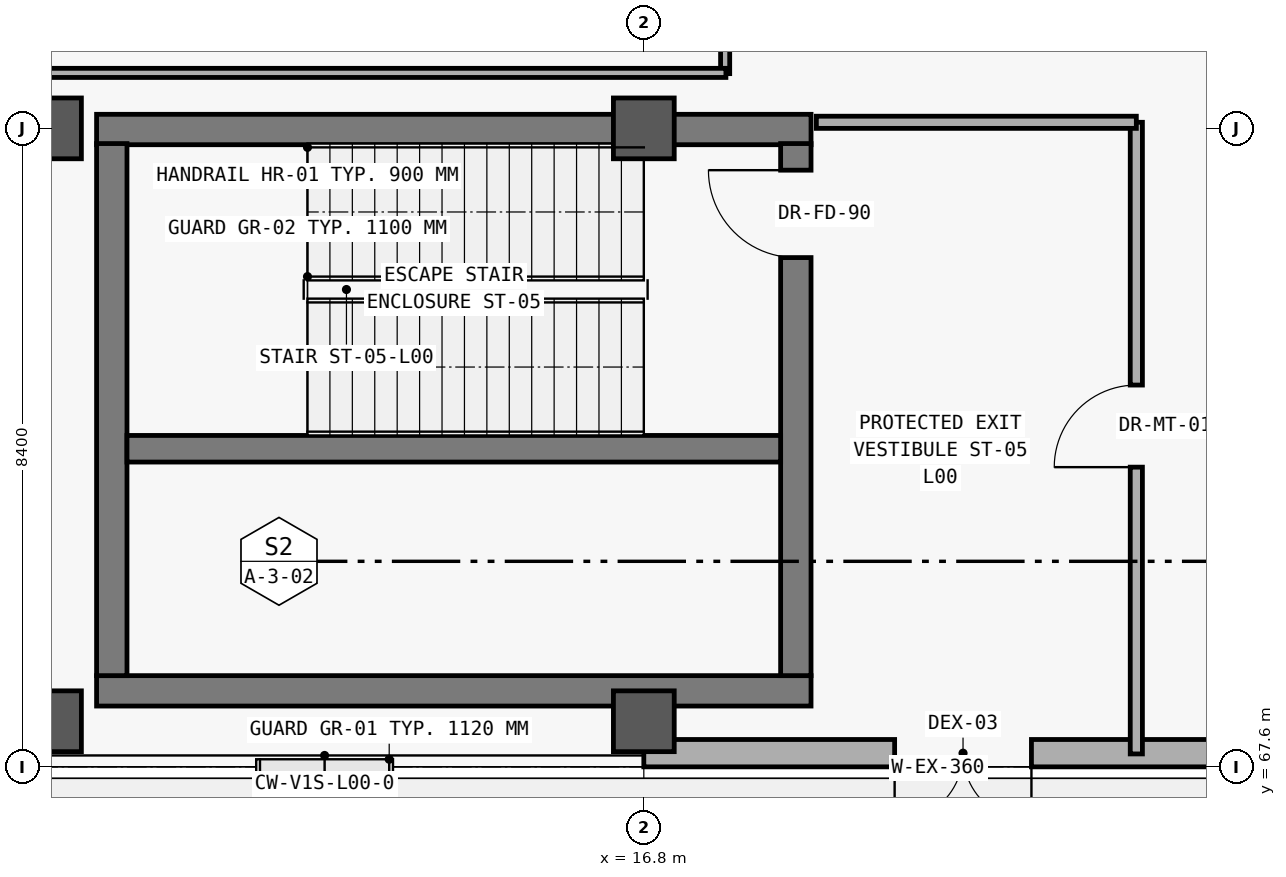
"""IFC4 building model, lengths in metres.
Left out: names, types, materials, properties, quantities, classifications, styles, units other than length and angle.
Written with IfcOpenShell. Run it as: python <this file> out.ifc"""

import sys

from ifc_helpers import new_model, si_unit, direction, frame, frame_2d, origin, origin_2d, place, context, subcontext, project, spatial, rectangle, extrude, element, fill, save


model = new_model("IFC4")
c1 = context("Model", 3, precision=1e-05, world=origin(), true_north=direction((0.0, 1.0)))
c2 = subcontext(c1, "Body", "Model", "MODEL_VIEW")
j1 = project(units=[si_unit("LENGTHUNIT", "METRE"), si_unit("PLANEANGLEUNIT", "RADIAN")], contexts=[c1])
p1 = place(None, origin())
s1 = spatial("IfcSite", under=j1, at=p1, CompositionType="ELEMENT")
p2 = place(p1, origin())
s2 = spatial("IfcBuilding", under=s1, at=p2, CompositionType="ELEMENT")
p3 = place(p2, origin())
s3 = spatial("IfcBuildingStorey", under=s2, at=p3, CompositionType="ELEMENT", Elevation=0.0)
for number, where, z_axis, x_axis in (
    (1, (9.0, 68.2, 0.0), (0.0, 0.0, 1.0), (1.0, 0.0, 0.0)),
    (2, (9.0, 76.0, 0.0), (0.0, 0.0, 1.0), (1.0, 0.0, 0.0)),
    (3, (16.8, 68.2, 0.0), (0.0, 0.0, 1.0), (1.0, 0.0, 0.0)),
    (4, (16.8, 76.0, 0.0), (0.0, 0.0, 1.0), (1.0, 0.0, 0.0)),
):
    element("IfcColumn", number, at=place(p3, frame(where, z_axis=z_axis, x_axis=x_axis)), inside=s3, PredefinedType="COLUMN", context=c2, shape_type="SweptSolid", body=[
        extrude(rectangle(XDim=0.8, YDim=0.8, at=origin_2d()), origin(), (0.0, 0.0, 1.0), 5.4),
    ])
p4 = place(p3, frame((25.2, 67.78, 0.0), z_axis=(0.0, 0.0, 1.0), x_axis=(-1.0, 0.0, 0.0)))
e5 = element("IfcWall", 5, at=p4, inside=s3, PredefinedType="SOLIDWALL", context=c2, shape_type="SweptSolid", body=[
    extrude(rectangle(XDim=8.4, YDim=0.36, at=frame_2d((4.2, 0.0))), origin(), (0.0, 0.0, 1.0), 5.08),
])
p5 = place(p4, frame((3.3, 0.0, 0.0)))
e6 = element("IfcOpeningElement", 6, at=p5, cuts=e5, PredefinedType="OPENING", context=c2, shape_type="SweptSolid", body=[
    extrude(rectangle(XDim=1.8, YDim=2.4, at=frame_2d((0.9, 1.2))), frame((0.0, 0.19, 0.0), z_axis=(0.0, -1.0, 0.0), x_axis=(1.0, 0.0, 0.0)), (0.0, 0.0, 1.0), 0.38),
])
for number, where, z_axis, x_axis in (
    (7, (9.6, 68.6, 0.0), (0.0, 0.0, 1.0), (1.0, 0.0, 0.0)),
    (8, (19.0, 75.985, 0.0), (0.0, 0.0, 1.0), (-1.0, 0.0, 0.0)),
):
    element("IfcWall", number, at=place(p3, frame(where, z_axis=z_axis, x_axis=x_axis)), inside=s3, PredefinedType="SHEAR", context=c2, shape_type="SweptSolid", body=[
        extrude(rectangle(XDim=9.4, YDim=0.4, at=frame_2d((4.7, 0.0))), origin(), (0.0, 0.0, 1.0), 5.08),
    ])
p6 = place(p3, frame((9.8, 75.8, 0.0), z_axis=(0.0, 0.0, 1.0), x_axis=(0.0, -1.0, 0.0)))
e9 = element("IfcWall", 9, at=p6, inside=s3, PredefinedType="SHEAR", context=c2, shape_type="SweptSolid", body=[
    extrude(rectangle(XDim=7.0, YDim=0.4, at=frame_2d((3.5, 0.0))), origin(), (0.0, 0.0, 1.0), 5.08),
])
p7 = place(p3, frame((18.8, 68.8, 0.0), z_axis=(0.0, 0.0, 1.0), x_axis=(0.0, 1.0, 0.0)))
e10 = element("IfcWall", 10, at=p7, inside=s3, PredefinedType="SHEAR", context=c2, shape_type="SweptSolid", body=[
    extrude(rectangle(XDim=7.0, YDim=0.4, at=frame_2d((3.5, 0.0))), origin(), (0.0, 0.0, 1.0), 5.08),
])
p8 = place(p7, frame((5.5, 0.0, 0.0)))
e11 = element("IfcOpeningElement", 11, at=p8, cuts=e10, PredefinedType="OPENING", context=c2, shape_type="SweptSolid", body=[
    extrude(rectangle(XDim=1.15, YDim=2.2, at=frame_2d((0.575, 1.1))), frame((0.0, 0.21, 0.0), z_axis=(0.0, -1.0, 0.0), x_axis=(1.0, 0.0, 0.0)), (0.0, 0.0, 1.0), 0.42),
])
p9 = place(p3, frame((10.0, 71.785, 0.0), z_axis=(0.0, 0.0, 1.0), x_axis=(1.0, 0.0, 0.0)))
e12 = element("IfcWall", 12, at=p9, inside=s3, PredefinedType="SHEAR", context=c2, shape_type="SweptSolid", body=[
    extrude(rectangle(XDim=8.6, YDim=0.35, at=frame_2d((4.3, 0.0))), origin(), (0.0, 0.0, 1.0), 5.08),
])
p10 = place(p3, frame((17.87, 76.72, 0.0), z_axis=(0.0, 0.0, 1.0), x_axis=(0.0, 1.0, 0.0)))
e13 = element("IfcWall", 13, at=p10, inside=s3, PredefinedType="PARTITIONING", context=c2, shape_type="SweptSolid", body=[
    extrude(rectangle(XDim=4.96, YDim=0.12, at=frame_2d((2.48, 0.0))), origin(), (0.0, 0.0, 1.0), 4.18),
])
p11 = place(p10, frame((3.006, 0.0, 0.0)))
e14 = element("IfcOpeningElement", 14, at=p11, cuts=e13, PredefinedType="OPENING", context=c2, shape_type="SweptSolid", body=[
    extrude(rectangle(XDim=0.92, YDim=2.15, at=frame_2d((0.46, 1.075))), frame((0.0, 0.07, 0.0), z_axis=(0.0, -1.0, 0.0), x_axis=(1.0, 0.0, 0.0)), (0.0, 0.0, 1.0), 0.14),
])
p12 = place(p3, frame((23.28, 67.77, 0.0), z_axis=(0.0, 0.0, 1.0), x_axis=(0.0, 1.0, 0.0)))
e15 = element("IfcWall", 15, at=p12, inside=s3, PredefinedType="PARTITIONING", context=c2, shape_type="SweptSolid", body=[
    extrude(rectangle(XDim=8.31, YDim=0.16, at=frame_2d((4.155, 0.0))), origin(), (0.0, 0.0, 1.0), 4.18),
])
p13 = place(p12, frame((3.773, 0.0, 0.0)))
e16 = element("IfcOpeningElement", 16, at=p13, cuts=e15, PredefinedType="OPENING", context=c2, shape_type="SweptSolid", body=[
    extrude(rectangle(XDim=1.08, YDim=2.25, at=frame_2d((0.54, 1.125))), frame((0.0, 0.09, 0.0), z_axis=(0.0, -1.0, 0.0), x_axis=(1.0, 0.0, 0.0)), (0.0, 0.0, 1.0), 0.18),
])
p14 = place(p3, frame((8.64, 76.73, 0.0), z_axis=(0.0, 0.0, 1.0), x_axis=(1.0, 0.0, 0.0)))
e17 = element("IfcWall", 17, at=p14, inside=s3, PredefinedType="PARTITIONING", context=c2, shape_type="SweptSolid", body=[
    extrude(rectangle(XDim=9.24, YDim=0.12, at=frame_2d((4.62, 0.0))), origin(), (0.0, 0.0, 1.0), 4.18),
])
p15 = place(p3, frame((19.07, 76.08, 0.0), z_axis=(0.0, 0.0, 1.0), x_axis=(1.0, 0.0, 0.0)))
e18 = element("IfcWall", 18, at=p15, inside=s3, PredefinedType="PARTITIONING", context=c2, shape_type="SweptSolid", body=[
    extrude(rectangle(XDim=4.21, YDim=0.16, at=frame_2d((2.105, 0.0))), origin(), (0.0, 0.0, 1.0), 4.18),
])
p16 = place(p5, origin())
e19 = element("IfcDoor", 19, at=p16, inside=s3, OperationType="DOUBLE_DOOR_SINGLE_SWING", PredefinedType="DOOR", context=c2, shape_type="SweptSolid", body=[
    extrude(rectangle(XDim=1.8, YDim=2.4, at=frame_2d((0.9, 1.2))), frame((0.0, 0.025, 0.0), z_axis=(0.0, -1.0, 0.0), x_axis=(1.0, 0.0, 0.0)), (0.0, 0.0, 1.0), 0.05),
])
fill(e6, e19)
p17 = place(p8, origin())
e20 = element("IfcDoor", 20, at=p17, inside=s3, OperationType="SINGLE_SWING_RIGHT", PredefinedType="DOOR", context=c2, shape_type="SweptSolid", body=[
    extrude(rectangle(XDim=1.15, YDim=2.2, at=frame_2d((0.575, 1.1))), frame((0.0, 0.025, 0.0), z_axis=(0.0, -1.0, 0.0), x_axis=(1.0, 0.0, 0.0)), (0.0, 0.0, 1.0), 0.05),
])
fill(e11, e20)
p18 = place(p13, origin())
e21 = element("IfcDoor", 21, at=p18, inside=s3, OperationType="SINGLE_SWING_LEFT", PredefinedType="DOOR", context=c2, shape_type="SweptSolid", body=[
    extrude(rectangle(XDim=1.08, YDim=2.25, at=frame_2d((0.54, 1.125))), frame((0.0, 0.025, 0.0), z_axis=(0.0, -1.0, 0.0), x_axis=(1.0, 0.0, 0.0)), (0.0, 0.0, 1.0), 0.05),
])
fill(e16, e21)
save(model, sys.argv[1])
